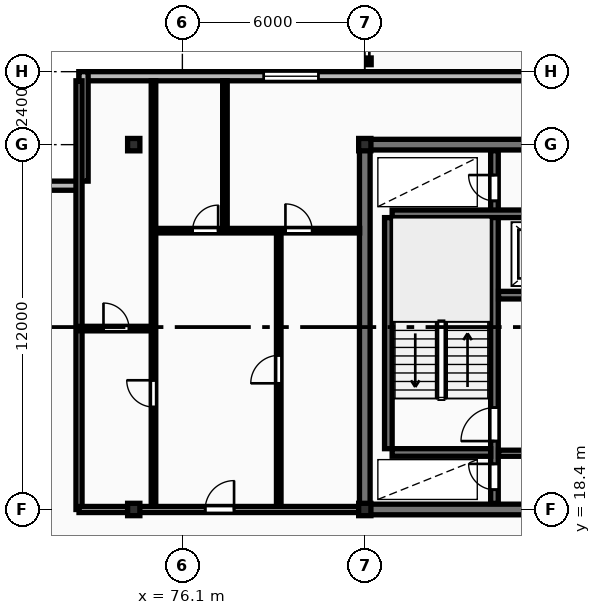
"""IFC4 building model, lengths in metres.
Left out: names, types, materials, properties, quantities, classifications, styles, units other than length and angle.
Written with IfcOpenShell. Run it as: python <this file> out.ifc"""

import sys

from ifc_helpers import new_model, si_unit, direction, frame, frame_2d, origin, origin_2d, place, context, subcontext, project, spatial, rectangle, i_section, extrude, element, fill, save


model = new_model("IFC4")
c1 = context("Model", 3, precision=1e-05, world=origin(), true_north=direction((0.0, 1.0)))
c2 = subcontext(c1, "Body", "Model", "MODEL_VIEW")
j1 = project(units=[si_unit("LENGTHUNIT", "METRE"), si_unit("PLANEANGLEUNIT", "RADIAN")], contexts=[c1])
p1 = place(None, origin())
s1 = spatial("IfcSite", under=j1, at=p1, CompositionType="ELEMENT")
p2 = place(p1, origin())
s2 = spatial("IfcBuilding", under=s1, at=p2, CompositionType="ELEMENT")
p3 = place(p2, frame((0.0, 0.0, 146.5)))
s3 = spatial("IfcBuildingStorey", under=s2, at=p3, CompositionType="ELEMENT", Elevation=146.5)
for number, where, z_axis, x_axis in (
    (1, (74.5, 18.4, 0.0), (0.0, 0.0, 1.0), (1.0, 0.0, 0.0)),
    (2, (74.5, 30.4, 0.0), (0.0, 0.0, 1.0), (1.0, 0.0, 0.0)),
    (3, (82.1, 18.4, 0.0), (0.0, 0.0, 1.0), (1.0, 0.0, 0.0)),
    (4, (82.1, 30.4, 0.0), (0.0, 0.0, 1.0), (1.0, 0.0, 0.0)),
):
    element("IfcColumn", number, at=place(p3, frame(where, z_axis=z_axis, x_axis=x_axis)), inside=s3, PredefinedType="COLUMN", context=c2, shape_type="SweptSolid", body=[
        extrude(i_section(OverallWidth=0.403, OverallDepth=0.406, WebThickness=0.027, FlangeThickness=0.043, FilletRadius=0.015, at=origin_2d()), origin(), (0.0, 0.0, 1.0), 3.6),
    ])
p4 = place(p3, frame((130.7, 32.65, 0.0), z_axis=(0.0, 0.0, 1.0), x_axis=(-1.0, 0.0, 0.0)))
e5 = element("IfcWall", 5, at=p4, inside=s3, PredefinedType="STANDARD", context=c2, shape_type="SweptSolid", body=[
    extrude(rectangle(XDim=58.0, YDim=0.3, at=frame_2d((29.0, 0.0))), origin(), (0.0, 0.0, 1.0), 3.31),
])
p5 = place(p4, frame((50.125, 0.0, 0.85)))
e6 = element("IfcOpeningElement", 6, at=p5, cuts=e5, PredefinedType="OPENING", context=c2, shape_type="SweptSolid", body=[
    extrude(rectangle(XDim=1.8, YDim=1.8, at=frame_2d((0.9, 0.9))), frame((0.0, 0.16, 0.0), z_axis=(0.0, -1.0, 0.0), x_axis=(1.0, 0.0, 0.0)), (0.0, 0.0, 1.0), 0.32),
])
p6 = place(p4, frame((6.775, 0.0, 0.85)))
e7 = element("IfcOpeningElement", 7, at=p6, cuts=e5, PredefinedType="OPENING", context=c2, shape_type="SweptSolid", body=[
    extrude(rectangle(XDim=1.8, YDim=1.8, at=frame_2d((0.9, 0.9))), frame((0.0, 0.16, 0.0), z_axis=(0.0, -1.0, 0.0), x_axis=(1.0, 0.0, 0.0)), (0.0, 0.0, 1.0), 0.32),
])
p7 = place(p4, frame((38.0, 0.0, 0.0)))
e8 = element("IfcOpeningElement", 8, at=p7, cuts=e5, PredefinedType="OPENING", context=c2, shape_type="SweptSolid", body=[
    extrude(rectangle(XDim=1.1, YDim=2.1, at=frame_2d((0.55, 1.05))), frame((0.0, 0.16, 0.0), z_axis=(0.0, -1.0, 0.0), x_axis=(1.0, 0.0, 0.0)), (0.0, 0.0, 1.0), 0.32),
])
p8 = place(p3, frame((72.85, 32.8, 0.0), z_axis=(0.0, 0.0, 1.0), x_axis=(0.0, -1.0, 0.0)))
e9 = element("IfcWall", 9, at=p8, inside=s3, PredefinedType="STANDARD", context=c2, shape_type="SweptSolid", body=[
    extrude(rectangle(XDim=3.6, YDim=0.3, at=frame_2d((1.8, 0.0))), origin(), (0.0, 0.0, 1.0), 3.31),
])
p9 = place(p3, frame((72.7, 29.05, 0.0), z_axis=(0.0, 0.0, 1.0), x_axis=(-1.0, 0.0, 0.0)))
e10 = element("IfcWall", 10, at=p9, inside=s3, PredefinedType="STANDARD", context=c2, shape_type="SweptSolid", body=[
    extrude(rectangle(XDim=3.6, YDim=0.3, at=frame_2d((1.8, 0.0))), origin(), (0.0, 0.0, 1.0), 3.31),
])
p10 = place(p3, frame((81.925, 30.4, 0.0), z_axis=(0.0, 0.0, 1.0), x_axis=(1.0, 0.0, 0.0)))
e11 = element("IfcWall", 11, at=p10, inside=s3, PredefinedType="SHEAR", context=c2, shape_type="SweptSolid", body=[
    extrude(rectangle(XDim=36.265, YDim=0.35, at=frame_2d((18.132, 0.0))), origin(), (0.0, 0.0, 1.0), 3.6),
])
p11 = place(p10, frame((9.675, 0.0, 0.0)))
e12 = element("IfcOpeningElement", 12, at=p11, cuts=e11, PredefinedType="OPENING", context=c2, shape_type="SweptSolid", body=[
    extrude(rectangle(XDim=1.1, YDim=2.1, at=frame_2d((0.55, 1.05))), frame((0.0, 0.185, 0.0), z_axis=(0.0, -1.0, 0.0), x_axis=(1.0, 0.0, 0.0)), (0.0, 0.0, 1.0), 0.37),
])
p12 = place(p3, frame((82.1, 18.575, 0.0), z_axis=(0.0, 0.0, 1.0), x_axis=(0.0, 1.0, 0.0)))
e13 = element("IfcWall", 13, at=p12, inside=s3, PredefinedType="SHEAR", context=c2, shape_type="SweptSolid", body=[
    extrude(rectangle(XDim=11.65, YDim=0.35, at=frame_2d((5.825, 0.0))), origin(), (0.0, 0.0, 1.0), 3.6),
])
p13 = place(p3, frame((81.925, 18.4, 0.0), z_axis=(0.0, 0.0, 1.0), x_axis=(1.0, 0.0, 0.0)))
e14 = element("IfcWall", 14, at=p13, inside=s3, PredefinedType="SHEAR", context=c2, shape_type="SweptSolid", body=[
    extrude(rectangle(XDim=36.265, YDim=0.35, at=frame_2d((18.132, 0.0))), origin(), (0.0, 0.0, 1.0), 3.6),
])
p14 = place(p13, frame((5.675, 0.0, 0.0)))
e15 = element("IfcOpeningElement", 15, at=p14, cuts=e14, PredefinedType="OPENING", context=c2, shape_type="SweptSolid", body=[
    extrude(rectangle(XDim=1.0, YDim=2.15, at=frame_2d((0.5, 1.075))), frame((0.0, 0.185, 0.0), z_axis=(0.0, -1.0, 0.0), x_axis=(1.0, 0.0, 0.0)), (0.0, 0.0, 1.0), 0.37),
])
p15 = place(p13, frame((21.925, 0.0, 0.0)))
e16 = element("IfcOpeningElement", 16, at=p15, cuts=e14, PredefinedType="OPENING", context=c2, shape_type="SweptSolid", body=[
    extrude(rectangle(XDim=1.5, YDim=2.2, at=frame_2d((0.75, 1.1))), frame((0.0, 0.185, 0.0), z_axis=(0.0, -1.0, 0.0), x_axis=(1.0, 0.0, 0.0)), (0.0, 0.0, 1.0), 0.37),
])
p16 = place(p13, frame((29.875, 0.0, 0.0)))
e17 = element("IfcOpeningElement", 17, at=p16, cuts=e14, PredefinedType="OPENING", context=c2, shape_type="SweptSolid", body=[
    extrude(rectangle(XDim=1.0, YDim=2.15, at=frame_2d((0.5, 1.075))), frame((0.0, 0.185, 0.0), z_axis=(0.0, -1.0, 0.0), x_axis=(1.0, 0.0, 0.0)), (0.0, 0.0, 1.0), 0.37),
])
p17 = place(p3, frame((82.875, 20.4, 0.0), z_axis=(0.0, 0.0, 1.0), x_axis=(0.0, 1.0, 0.0)))
e18 = element("IfcWall", 18, at=p17, inside=s3, PredefinedType="SHEAR", context=c2, shape_type="SweptSolid", body=[
    extrude(rectangle(XDim=7.6, YDim=0.25, at=frame_2d((3.8, 0.0))), origin(), (0.0, 0.0, 1.0), 3.6),
])
p18 = place(p3, frame((86.365, 18.6, 0.0), z_axis=(0.0, 0.0, 1.0), x_axis=(0.0, 1.0, 0.0)))
e19 = element("IfcWall", 19, at=p18, inside=s3, PredefinedType="SHEAR", context=c2, shape_type="SweptSolid", body=[
    extrude(rectangle(XDim=11.6, YDim=0.25, at=frame_2d((5.8, 0.0))), origin(), (0.0, 0.0, 1.0), 3.6),
])
p19 = place(p18, frame((0.45, 0.0, 0.0)))
e20 = element("IfcOpeningElement", 20, at=p19, cuts=e19, PredefinedType="OPENING", context=c2, shape_type="SweptSolid", body=[
    extrude(rectangle(XDim=0.85, YDim=2.05, at=frame_2d((0.425, 1.025))), frame((0.0, 0.135, 0.0), z_axis=(0.0, -1.0, 0.0), x_axis=(1.0, 0.0, 0.0)), (0.0, 0.0, 1.0), 0.27),
])
p20 = place(p18, frame((2.05, 0.0, 0.0)))
e21 = element("IfcOpeningElement", 21, at=p20, cuts=e19, PredefinedType="OPENING", context=c2, shape_type="SweptSolid", body=[
    extrude(rectangle(XDim=1.1, YDim=2.1, at=frame_2d((0.55, 1.05))), frame((0.0, 0.135, 0.0), z_axis=(0.0, -1.0, 0.0), x_axis=(1.0, 0.0, 0.0)), (0.0, 0.0, 1.0), 0.27),
])
p21 = place(p18, frame((9.95, 0.0, 0.0)))
e22 = element("IfcOpeningElement", 22, at=p21, cuts=e19, PredefinedType="OPENING", context=c2, shape_type="SweptSolid", body=[
    extrude(rectangle(XDim=0.85, YDim=2.05, at=frame_2d((0.425, 1.025))), frame((0.0, 0.135, 0.0), z_axis=(0.0, -1.0, 0.0), x_axis=(1.0, 0.0, 0.0)), (0.0, 0.0, 1.0), 0.27),
])
p22 = place(p3, frame((83.0, 20.275, 0.0), z_axis=(0.0, 0.0, 1.0), x_axis=(1.0, 0.0, 0.0)))
e23 = element("IfcWall", 23, at=p22, inside=s3, PredefinedType="SHEAR", context=c2, shape_type="SweptSolid", body=[
    extrude(rectangle(XDim=3.24, YDim=0.25, at=frame_2d((1.62, 0.0))), origin(), (0.0, 0.0, 1.0), 3.6),
])
p23 = place(p3, frame((83.0, 28.125, 0.0), z_axis=(0.0, 0.0, 1.0), x_axis=(1.0, 0.0, 0.0)))
e24 = element("IfcWall", 24, at=p23, inside=s3, PredefinedType="SHEAR", context=c2, shape_type="SweptSolid", body=[
    extrude(rectangle(XDim=7.82, YDim=0.25, at=frame_2d((3.91, 0.0))), origin(), (0.0, 0.0, 1.0), 3.6),
])
p24 = place(p3, frame((86.5, 25.45, 0.0), z_axis=(0.0, 0.0, 1.0), x_axis=(1.0, 0.0, 0.0)))
e25 = element("IfcWall", 25, at=p24, inside=s3, PredefinedType="SHEAR", context=c2, shape_type="SweptSolid", body=[
    extrude(rectangle(XDim=4.32, YDim=0.25, at=frame_2d((2.16, 0.0))), origin(), (0.0, 0.0, 1.0), 3.6),
])
p25 = place(p24, frame((1.14, 0.0, 0.0)))
e26 = element("IfcOpeningElement", 26, at=p25, cuts=e25, PredefinedType="OPENING", context=c2, shape_type="SweptSolid", body=[
    extrude(rectangle(XDim=1.12, YDim=2.12, at=frame_2d((0.56, 1.06))), frame((0.0, 0.135, 0.0), z_axis=(0.0, -1.0, 0.0), x_axis=(1.0, 0.0, 0.0)), (0.0, 0.0, 1.0), 0.27),
])
p26 = place(p24, frame((3.25, 0.0, 0.0)))
e27 = element("IfcOpeningElement", 27, at=p26, cuts=e25, PredefinedType="OPENING", context=c2, shape_type="SweptSolid", body=[
    extrude(rectangle(XDim=0.85, YDim=2.05, at=frame_2d((0.425, 1.025))), frame((0.0, 0.135, 0.0), z_axis=(0.0, -1.0, 0.0), x_axis=(1.0, 0.0, 0.0)), (0.0, 0.0, 1.0), 0.27),
])
p27 = place(p3, frame((86.5, 20.25, 0.0), z_axis=(0.0, 0.0, 1.0), x_axis=(1.0, 0.0, 0.0)))
e28 = element("IfcWall", 28, at=p27, inside=s3, PredefinedType="PARTITIONING", context=c2, shape_type="SweptSolid", body=[
    extrude(rectangle(XDim=4.32, YDim=0.2, at=frame_2d((2.16, 0.0))), origin(), (0.0, 0.0, 1.0), 3.31),
])
p28 = place(p27, frame((1.4, 0.0, 0.0)))
e29 = element("IfcOpeningElement", 29, at=p28, cuts=e28, PredefinedType="OPENING", context=c2, shape_type="SweptSolid", body=[
    extrude(rectangle(XDim=1.1, YDim=2.1, at=frame_2d((0.55, 1.05))), frame((0.0, 0.11, 0.0), z_axis=(0.0, -1.0, 0.0), x_axis=(1.0, 0.0, 0.0)), (0.0, 0.0, 1.0), 0.22),
])
p29 = place(p3, frame((72.7, 18.4, 0.0), z_axis=(0.0, 0.0, 1.0), x_axis=(0.0, 1.0, 0.0)))
e30 = element("IfcWall", 30, at=p29, inside=s3, PredefinedType="PARTITIONING", context=c2, shape_type="SweptSolid", body=[
    extrude(rectangle(XDim=14.1, YDim=0.2, at=frame_2d((7.05, 0.0))), origin(), (0.0, 0.0, 1.0), 3.31),
])
p30 = place(p3, frame((72.7, 24.35, 0.0), z_axis=(0.0, 0.0, 1.0), x_axis=(1.0, 0.0, 0.0)))
e31 = element("IfcWall", 31, at=p30, inside=s3, PredefinedType="PARTITIONING", context=c2, shape_type="SweptSolid", body=[
    extrude(rectangle(XDim=2.45, YDim=0.15, at=frame_2d((1.225, 0.0))), origin(), (0.0, 0.0, 1.0), 3.31),
])
p31 = place(p30, frame((0.805, 0.0, 0.0)))
e32 = element("IfcOpeningElement", 32, at=p31, cuts=e31, PredefinedType="OPENING", context=c2, shape_type="SweptSolid", body=[
    extrude(rectangle(XDim=0.84, YDim=2.04, at=frame_2d((0.42, 1.02))), frame((0.0, 0.085, 0.0), z_axis=(0.0, -1.0, 0.0), x_axis=(1.0, 0.0, 0.0)), (0.0, 0.0, 1.0), 0.17),
])
p32 = place(p3, frame((75.15, 18.45, 0.0), z_axis=(0.0, 0.0, 1.0), x_axis=(0.0, 1.0, 0.0)))
e33 = element("IfcWall", 33, at=p32, inside=s3, PredefinedType="PARTITIONING", context=c2, shape_type="SweptSolid", body=[
    extrude(rectangle(XDim=14.05, YDim=0.15, at=frame_2d((7.025, 0.0))), origin(), (0.0, 0.0, 1.0), 3.31),
])
p33 = place(p32, frame((3.32, 0.0, 0.0)))
e34 = element("IfcOpeningElement", 34, at=p33, cuts=e33, PredefinedType="OPENING", context=c2, shape_type="SweptSolid", body=[
    extrude(rectangle(XDim=0.88, YDim=2.06, at=frame_2d((0.44, 1.03))), frame((0.0, 0.085, 0.0), z_axis=(0.0, -1.0, 0.0), x_axis=(1.0, 0.0, 0.0)), (0.0, 0.0, 1.0), 0.17),
])
p34 = place(p3, frame((79.27, 18.45, 0.0), z_axis=(0.0, 0.0, 1.0), x_axis=(0.0, 1.0, 0.0)))
e35 = element("IfcWall", 35, at=p34, inside=s3, PredefinedType="PARTITIONING", context=c2, shape_type="SweptSolid", body=[
    extrude(rectangle(XDim=9.12, YDim=0.15, at=frame_2d((4.56, 0.0))), origin(), (0.0, 0.0, 1.0), 3.31),
])
p35 = place(p34, frame((4.1, 0.0, 0.0)))
e36 = element("IfcOpeningElement", 36, at=p35, cuts=e35, PredefinedType="OPENING", context=c2, shape_type="SweptSolid", body=[
    extrude(rectangle(XDim=0.92, YDim=2.08, at=frame_2d((0.46, 1.04))), frame((0.0, 0.085, 0.0), z_axis=(0.0, -1.0, 0.0), x_axis=(1.0, 0.0, 0.0)), (0.0, 0.0, 1.0), 0.17),
])
p36 = place(p3, frame((77.5, 27.57, 0.0), z_axis=(0.0, 0.0, 1.0), x_axis=(0.0, 1.0, 0.0)))
e37 = element("IfcWall", 37, at=p36, inside=s3, PredefinedType="PARTITIONING", context=c2, shape_type="SweptSolid", body=[
    extrude(rectangle(XDim=4.93, YDim=0.15, at=frame_2d((2.465, 0.0))), origin(), (0.0, 0.0, 1.0), 3.31),
])
p37 = place(p3, frame((75.17, 27.57, 0.0), z_axis=(0.0, 0.0, 1.0), x_axis=(1.0, 0.0, 0.0)))
e38 = element("IfcWall", 38, at=p37, inside=s3, PredefinedType="PARTITIONING", context=c2, shape_type="SweptSolid", body=[
    extrude(rectangle(XDim=6.76, YDim=0.15, at=frame_2d((3.38, 0.0))), origin(), (0.0, 0.0, 1.0), 3.31),
])
p38 = place(p37, frame((1.266, 0.0, 0.0)))
e39 = element("IfcOpeningElement", 39, at=p38, cuts=e38, PredefinedType="OPENING", context=c2, shape_type="SweptSolid", body=[
    extrude(rectangle(XDim=0.84, YDim=2.04, at=frame_2d((0.42, 1.02))), frame((0.0, 0.085, 0.0), z_axis=(0.0, -1.0, 0.0), x_axis=(1.0, 0.0, 0.0)), (0.0, 0.0, 1.0), 0.17),
])
p39 = place(p37, frame((4.32, 0.0, 0.0)))
e40 = element("IfcOpeningElement", 40, at=p39, cuts=e38, PredefinedType="OPENING", context=c2, shape_type="SweptSolid", body=[
    extrude(rectangle(XDim=0.88, YDim=2.06, at=frame_2d((0.44, 1.03))), frame((0.0, 0.085, 0.0), z_axis=(0.0, -1.0, 0.0), x_axis=(1.0, 0.0, 0.0)), (0.0, 0.0, 1.0), 0.17),
])
p40 = place(p3, frame((72.7, 18.4, 0.0), z_axis=(0.0, 0.0, 1.0), x_axis=(1.0, 0.0, 0.0)))
e41 = element("IfcWall", 41, at=p40, inside=s3, PredefinedType="PARTITIONING", context=c2, shape_type="SweptSolid", body=[
    extrude(rectangle(XDim=9.25, YDim=0.2, at=frame_2d((4.625, 0.0))), origin(), (0.0, 0.0, 1.0), 2.698),
])
p41 = place(p40, frame((4.15, 0.0, 0.0)))
e42 = element("IfcOpeningElement", 42, at=p41, cuts=e41, PredefinedType="OPENING", context=c2, shape_type="SweptSolid", body=[
    extrude(rectangle(XDim=0.95, YDim=2.15, at=frame_2d((0.475, 1.075))), frame((0.0, 0.11, 0.0), z_axis=(0.0, -1.0, 0.0), x_axis=(1.0, 0.0, 0.0)), (0.0, 0.0, 1.0), 0.22),
])
p42 = place(p5, origin())
e43 = element("IfcWindow", 43, at=p42, inside=s3, PartitioningType="SINGLE_PANEL", PredefinedType="WINDOW", context=c2, shape_type="SweptSolid", body=[
    extrude(rectangle(XDim=1.8, YDim=1.8, at=frame_2d((0.9, 0.9))), frame((0.0, 0.03, 0.0), z_axis=(0.0, -1.0, 0.0), x_axis=(1.0, 0.0, 0.0)), (0.0, 0.0, 1.0), 0.06),
])
fill(e6, e43)
p43 = place(p19, origin())
e44 = element("IfcDoor", 44, at=p43, inside=s3, OperationType="SINGLE_SWING_RIGHT", PredefinedType="DOOR", context=c2, shape_type="SweptSolid", body=[
    extrude(rectangle(XDim=0.85, YDim=2.05, at=frame_2d((0.425, 1.025))), frame((0.0, 0.025, 0.0), z_axis=(0.0, -1.0, 0.0), x_axis=(1.0, 0.0, 0.0)), (0.0, 0.0, 1.0), 0.05),
])
fill(e20, e44)
p44 = place(p20, origin())
e45 = element("IfcDoor", 45, at=p44, inside=s3, OperationType="SINGLE_SWING_LEFT", PredefinedType="DOOR", context=c2, shape_type="SweptSolid", body=[
    extrude(rectangle(XDim=1.1, YDim=2.1, at=frame_2d((0.55, 1.05))), frame((0.0, 0.025, 0.0), z_axis=(0.0, -1.0, 0.0), x_axis=(1.0, 0.0, 0.0)), (0.0, 0.0, 1.0), 0.05),
])
fill(e21, e45)
p45 = place(p21, origin())
e46 = element("IfcDoor", 46, at=p45, inside=s3, OperationType="SINGLE_SWING_RIGHT", PredefinedType="DOOR", context=c2, shape_type="SweptSolid", body=[
    extrude(rectangle(XDim=0.85, YDim=2.05, at=frame_2d((0.425, 1.025))), frame((0.0, 0.025, 0.0), z_axis=(0.0, -1.0, 0.0), x_axis=(1.0, 0.0, 0.0)), (0.0, 0.0, 1.0), 0.05),
])
fill(e22, e46)
p46 = place(p31, origin())
e47 = element("IfcDoor", 47, at=p46, inside=s3, OperationType="SINGLE_SWING_LEFT", PredefinedType="DOOR", context=c2, shape_type="SweptSolid", body=[
    extrude(rectangle(XDim=0.84, YDim=2.04, at=frame_2d((0.42, 1.02))), frame((0.0, 0.025, 0.0), z_axis=(0.0, -1.0, 0.0), x_axis=(1.0, 0.0, 0.0)), (0.0, 0.0, 1.0), 0.05),
])
fill(e32, e47)
p47 = place(p33, origin())
e48 = element("IfcDoor", 48, at=p47, inside=s3, OperationType="SINGLE_SWING_RIGHT", PredefinedType="DOOR", context=c2, shape_type="SweptSolid", body=[
    extrude(rectangle(XDim=0.88, YDim=2.06, at=frame_2d((0.44, 1.03))), frame((0.0, 0.025, 0.0), z_axis=(0.0, -1.0, 0.0), x_axis=(1.0, 0.0, 0.0)), (0.0, 0.0, 1.0), 0.05),
])
fill(e34, e48)
p48 = place(p35, origin())
e49 = element("IfcDoor", 49, at=p48, inside=s3, OperationType="SINGLE_SWING_LEFT", PredefinedType="DOOR", context=c2, shape_type="SweptSolid", body=[
    extrude(rectangle(XDim=0.92, YDim=2.08, at=frame_2d((0.46, 1.04))), frame((0.0, 0.025, 0.0), z_axis=(0.0, -1.0, 0.0), x_axis=(1.0, 0.0, 0.0)), (0.0, 0.0, 1.0), 0.05),
])
fill(e36, e49)
p49 = place(p38, origin())
e50 = element("IfcDoor", 50, at=p49, inside=s3, OperationType="SINGLE_SWING_RIGHT", PredefinedType="DOOR", context=c2, shape_type="SweptSolid", body=[
    extrude(rectangle(XDim=0.84, YDim=2.04, at=frame_2d((0.42, 1.02))), frame((0.0, 0.025, 0.0), z_axis=(0.0, -1.0, 0.0), x_axis=(1.0, 0.0, 0.0)), (0.0, 0.0, 1.0), 0.05),
])
fill(e39, e50)
p50 = place(p39, origin())
e51 = element("IfcDoor", 51, at=p50, inside=s3, OperationType="SINGLE_SWING_LEFT", PredefinedType="DOOR", context=c2, shape_type="SweptSolid", body=[
    extrude(rectangle(XDim=0.88, YDim=2.06, at=frame_2d((0.44, 1.03))), frame((0.0, 0.025, 0.0), z_axis=(0.0, -1.0, 0.0), x_axis=(1.0, 0.0, 0.0)), (0.0, 0.0, 1.0), 0.05),
])
fill(e40, e51)
p51 = place(p41, origin())
e52 = element("IfcDoor", 52, at=p51, inside=s3, OperationType="SINGLE_SWING_RIGHT", PredefinedType="DOOR", context=c2, shape_type="SweptSolid", body=[
    extrude(rectangle(XDim=0.95, YDim=2.15, at=frame_2d((0.475, 1.075))), frame((0.0, 0.025, 0.0), z_axis=(0.0, -1.0, 0.0), x_axis=(1.0, 0.0, 0.0)), (0.0, 0.0, 1.0), 0.05),
])
fill(e42, e52)
save(model, sys.argv[1])
